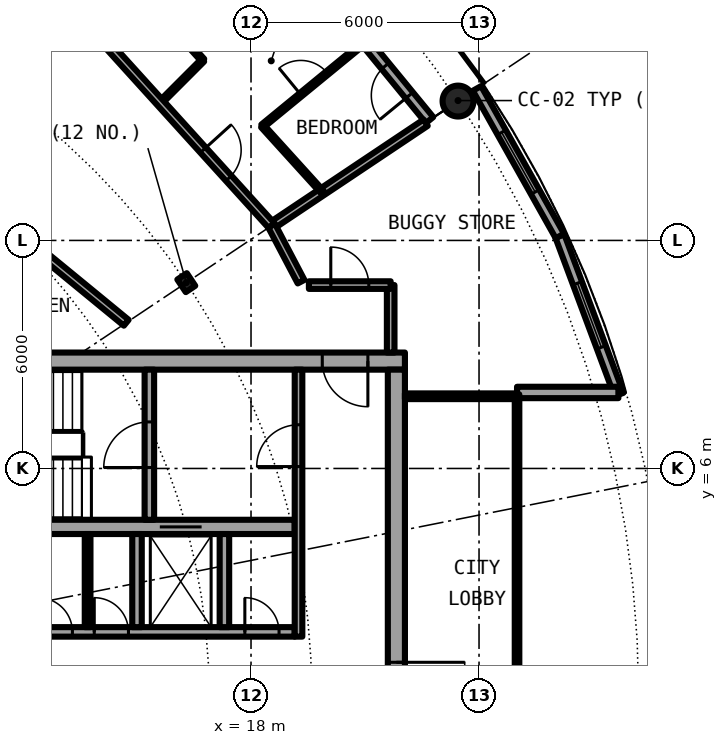
"""IFC4 building model, lengths in metres.
Left out: names, types, materials, properties, quantities, classifications, styles, units other than length and angle.
Written with IfcOpenShell. Run it as: python <this file> out.ifc"""

import sys

from ifc_helpers import new_model, si_unit, direction, frame, frame_2d, origin, origin_2d, place, context, subcontext, project, spatial, rectangle, hollow_circle, i_section, extrude, element, fill, save


model = new_model("IFC4")
c1 = context("Model", 3, precision=1e-05, world=origin(), true_north=direction((0.0, 1.0)))
c2 = subcontext(c1, "Body", "Model", "MODEL_VIEW")
j1 = project(units=[si_unit("LENGTHUNIT", "METRE"), si_unit("PLANEANGLEUNIT", "RADIAN")], contexts=[c1])
p1 = place(None, origin())
s1 = spatial("IfcSite", under=j1, at=p1, CompositionType="ELEMENT")
p2 = place(p1, origin())
s2 = spatial("IfcBuilding", under=s1, at=p2, CompositionType="ELEMENT")
p3 = place(p2, frame((0.0, 0.0, 212.7)))
s3 = spatial("IfcBuildingStorey", under=s2, at=p3, CompositionType="ELEMENT", Elevation=212.7)
p4 = place(p3, frame((23.448, 15.667, 0.0), z_axis=(0.0, 0.0, 1.0), x_axis=(1.0, 0.0, 0.0)))
e1 = element("IfcColumn", 1, at=p4, inside=s3, PredefinedType="COLUMN", context=c2, shape_type="SweptSolid", body=[
    extrude(hollow_circle(Radius=0.406, WallThickness=0.03, at=origin_2d()), origin(), (0.0, 0.0, 1.0), 3.05),
])
p5 = place(p3, frame((16.297, 10.889, 0.0), z_axis=(0.0, 0.0, 1.0), x_axis=(0.831469612303, 0.55557023302, 0.0)))
e2 = element("IfcColumn", 2, at=p5, inside=s3, PredefinedType="COLUMN", context=c2, shape_type="SweptSolid", body=[
    extrude(i_section(OverallWidth=0.3, OverallDepth=0.4, WebThickness=0.013, FlangeThickness=0.024, FilletRadius=0.027, at=origin_2d()), origin(), (0.0, 0.0, 1.0), 3.05),
])
p6 = place(p3, frame((22.699, 15.167, 0.0), z_axis=(0.0, 0.0, 1.0), x_axis=(-0.634382322723, 0.773019449054, 0.0)))
e3 = element("IfcWall", 3, at=p6, inside=s3, PredefinedType="SOLIDWALL", context=c2, shape_type="SweptSolid", body=[
    extrude(rectangle(XDim=5.352, YDim=0.25, at=frame_2d((2.676, 0.0))), origin(), (0.0, 0.0, 1.0), 2.7),
])
p7 = place(p6, frame((0.841, 0.0, 0.0)))
e4 = element("IfcOpeningElement", 4, at=p7, cuts=e3, PredefinedType="OPENING", context=c2, shape_type="SweptSolid", body=[
    extrude(rectangle(XDim=1.0, YDim=2.2, at=frame_2d((0.5, 1.1))), frame((0.0, 0.135, 0.0), z_axis=(0.0, -1.0, 0.0), x_axis=(1.0, 0.0, 0.0)), (0.0, 0.0, 1.0), 0.27),
])
p8 = place(p6, frame((3.111, 0.0, 0.3)))
e5 = element("IfcOpeningElement", 5, at=p8, cuts=e3, PredefinedType="OPENING", context=c2, shape_type="SweptSolid", body=[
    extrude(rectangle(XDim=1.8, YDim=2.1, at=frame_2d((0.9, 1.05))), frame((0.0, 0.135, 0.0), z_axis=(0.0, -1.0, 0.0), x_axis=(1.0, 0.0, 0.0)), (0.0, 0.0, 1.0), 0.27),
])
p9 = place(p3, frame((27.682, 7.945, 0.0), z_axis=(0.0, 0.0, 1.0), x_axis=(-0.349247811493, 0.937030397675, 0.0)))
e6 = element("IfcWall", 6, at=p9, inside=s3, PredefinedType="SOLIDWALL", context=c2, shape_type="SweptSolid", body=[
    extrude(rectangle(XDim=4.452, YDim=0.25, at=frame_2d((2.226, 0.0))), origin(), (0.0, 0.0, 1.0), 2.7),
])
p10 = place(p9, frame((1.327, 0.0, 0.3)))
e7 = element("IfcOpeningElement", 7, at=p10, cuts=e6, PredefinedType="OPENING", context=c2, shape_type="SweptSolid", body=[
    extrude(rectangle(XDim=1.8, YDim=2.1, at=frame_2d((0.9, 1.05))), frame((0.0, 0.135, 0.0), z_axis=(0.0, -1.0, 0.0), x_axis=(1.0, 0.0, 0.0)), (0.0, 0.0, 1.0), 0.27),
])
p11 = place(p3, frame((26.127, 12.117, 0.0), z_axis=(0.0, 0.0, 1.0), x_axis=(-0.489696356642, 0.871893042919, 0.0)))
e8 = element("IfcWall", 8, at=p11, inside=s3, PredefinedType="SOLIDWALL", context=c2, shape_type="SweptSolid", body=[
    extrude(rectangle(XDim=4.454, YDim=0.25, at=frame_2d((2.227, 0.0))), origin(), (0.0, 0.0, 1.0), 2.7),
])
p12 = place(p11, frame((1.327, 0.0, 0.3)))
e9 = element("IfcOpeningElement", 9, at=p12, cuts=e8, PredefinedType="OPENING", context=c2, shape_type="SweptSolid", body=[
    extrude(rectangle(XDim=1.8, YDim=2.1, at=frame_2d((0.9, 1.05))), frame((0.0, 0.135, 0.0), z_axis=(0.0, -1.0, 0.0), x_axis=(1.0, 0.0, 0.0)), (0.0, 0.0, 1.0), 0.27),
])
p13 = place(p3, frame((25.0, 8.0, 0.0), z_axis=(0.0, 0.0, 1.0), x_axis=(1.0, 0.0, 0.0)))
e10 = element("IfcWall", 10, at=p13, inside=s3, PredefinedType="SOLIDWALL", context=c2, shape_type="SweptSolid", body=[
    extrude(rectangle(XDim=2.667, YDim=0.3, at=frame_2d((1.333, 0.0))), origin(), (0.0, 0.0, 1.0), 2.7),
])
p14 = place(p3, frame((22.05, 8.825, 0.0), z_axis=(0.0, 0.0, 1.0), x_axis=(-1.0, 0.0, 0.0)))
e11 = element("IfcWall", 11, at=p14, inside=s3, PredefinedType="SHEAR", context=c2, shape_type="SweptSolid", body=[
    extrude(rectangle(XDim=13.5, YDim=0.45, at=frame_2d((6.75, 0.0))), origin(), (0.0, 0.0, 1.0), 3.05),
])
p15 = place(p14, frame((0.975, 0.0, 0.0)))
e12 = element("IfcOpeningElement", 12, at=p15, cuts=e11, PredefinedType="OPENING", context=c2, shape_type="SweptSolid", body=[
    extrude(rectangle(XDim=1.2, YDim=2.3, at=frame_2d((0.6, 1.15))), frame((0.0, 0.235, 0.0), z_axis=(0.0, -1.0, 0.0), x_axis=(1.0, 0.0, 0.0)), (0.0, 0.0, 1.0), 0.47),
])
p16 = place(p3, frame((21.825, 8.6, 0.0), z_axis=(0.0, 0.0, 1.0), x_axis=(0.0, -1.0, 0.0)))
e13 = element("IfcWall", 13, at=p16, inside=s3, PredefinedType="SHEAR", context=c2, shape_type="SweptSolid", body=[
    extrude(rectangle(XDim=17.2, YDim=0.45, at=frame_2d((8.6, 0.0))), origin(), (0.0, 0.0, 1.0), 3.05),
])
p17 = place(p16, frame((7.7, 0.0, 0.0)))
e14 = element("IfcOpeningElement", 14, at=p17, cuts=e13, PredefinedType="OPENING", context=c2, shape_type="SweptSolid", body=[
    extrude(rectangle(XDim=1.8, YDim=2.3, at=frame_2d((0.9, 1.15))), frame((0.0, 0.235, 0.0), z_axis=(0.0, -1.0, 0.0), x_axis=(1.0, 0.0, 0.0)), (0.0, 0.0, 1.0), 0.47),
])
p18 = place(p3, frame((9.0, 1.7, 0.0), z_axis=(0.0, 0.0, 1.0), x_axis=(1.0, 0.0, 0.0)))
e15 = element("IfcWall", 15, at=p18, inside=s3, PredefinedType="SHEAR", context=c2, shape_type="SweptSolid", body=[
    extrude(rectangle(XDim=10.15, YDim=0.25, at=frame_2d((5.075, 0.0))), origin(), (0.0, 0.0, 1.0), 3.05),
])
p19 = place(p18, frame((0.062, 0.0, 0.0)))
e16 = element("IfcOpeningElement", 16, at=p19, cuts=e15, PredefinedType="OPENING", context=c2, shape_type="SweptSolid", body=[
    extrude(rectangle(XDim=0.9, YDim=2.3, at=frame_2d((0.45, 1.15))), frame((0.0, 0.135, 0.0), z_axis=(0.0, -1.0, 0.0), x_axis=(1.0, 0.0, 0.0)), (0.0, 0.0, 1.0), 0.27),
])
p20 = place(p18, frame((1.6, 0.0, 0.0)))
e17 = element("IfcOpeningElement", 17, at=p20, cuts=e15, PredefinedType="OPENING", context=c2, shape_type="SweptSolid", body=[
    extrude(rectangle(XDim=0.9, YDim=2.3, at=frame_2d((0.45, 1.15))), frame((0.0, 0.135, 0.0), z_axis=(0.0, -1.0, 0.0), x_axis=(1.0, 0.0, 0.0)), (0.0, 0.0, 1.0), 0.27),
])
p21 = place(p18, frame((3.4, 0.0, 0.0)))
e18 = element("IfcOpeningElement", 18, at=p21, cuts=e15, PredefinedType="OPENING", context=c2, shape_type="SweptSolid", body=[
    extrude(rectangle(XDim=0.9, YDim=2.3, at=frame_2d((0.45, 1.15))), frame((0.0, 0.135, 0.0), z_axis=(0.0, -1.0, 0.0), x_axis=(1.0, 0.0, 0.0)), (0.0, 0.0, 1.0), 0.27),
])
p22 = place(p18, frame((4.875, 0.0, 0.0)))
e19 = element("IfcOpeningElement", 19, at=p22, cuts=e15, PredefinedType="OPENING", context=c2, shape_type="SweptSolid", body=[
    extrude(rectangle(XDim=0.9, YDim=2.3, at=frame_2d((0.45, 1.15))), frame((0.0, 0.135, 0.0), z_axis=(0.0, -1.0, 0.0), x_axis=(1.0, 0.0, 0.0)), (0.0, 0.0, 1.0), 0.27),
])
p23 = place(p18, frame((8.837, 0.0, 0.0)))
e20 = element("IfcOpeningElement", 20, at=p23, cuts=e15, PredefinedType="OPENING", context=c2, shape_type="SweptSolid", body=[
    extrude(rectangle(XDim=0.9, YDim=2.3, at=frame_2d((0.45, 1.15))), frame((0.0, 0.135, 0.0), z_axis=(0.0, -1.0, 0.0), x_axis=(1.0, 0.0, 0.0)), (0.0, 0.0, 1.0), 0.27),
])
p24 = place(p3, frame((9.0, 4.462, 0.0), z_axis=(0.0, 0.0, 1.0), x_axis=(1.0, 0.0, 0.0)))
e21 = element("IfcWall", 21, at=p24, inside=s3, PredefinedType="SHEAR", context=c2, shape_type="SweptSolid", body=[
    extrude(rectangle(XDim=10.15, YDim=0.375, at=frame_2d((5.075, 0.0))), origin(), (0.0, 0.0, 1.0), 3.05),
])
p25 = place(p24, frame((6.6, 0.0, 0.0)))
e22 = element("IfcOpeningElement", 22, at=p25, cuts=e21, PredefinedType="OPENING", context=c2, shape_type="SweptSolid", body=[
    extrude(rectangle(XDim=1.1, YDim=2.3, at=frame_2d((0.55, 1.15))), frame((0.0, 0.198, 0.0), z_axis=(0.0, -1.0, 0.0), x_axis=(1.0, 0.0, 0.0)), (0.0, 0.0, 1.0), 0.395),
])
p26 = place(p3, frame((15.325, 4.65, 0.0), z_axis=(0.0, 0.0, 1.0), x_axis=(0.0, 1.0, 0.0)))
e23 = element("IfcWall", 23, at=p26, inside=s3, PredefinedType="SHEAR", context=c2, shape_type="SweptSolid", body=[
    extrude(rectangle(XDim=3.95, YDim=0.25, at=frame_2d((1.975, 0.0))), origin(), (0.0, 0.0, 1.0), 3.05),
])
p27 = place(p26, frame((1.375, 0.0, 0.0)))
e24 = element("IfcOpeningElement", 24, at=p27, cuts=e23, PredefinedType="OPENING", context=c2, shape_type="SweptSolid", body=[
    extrude(rectangle(XDim=1.2, YDim=2.3, at=frame_2d((0.6, 1.15))), frame((0.0, 0.135, 0.0), z_axis=(0.0, -1.0, 0.0), x_axis=(1.0, 0.0, 0.0)), (0.0, 0.0, 1.0), 0.27),
])
for number, where, z_axis, x_axis in (
    (25, (15.0, 1.825, 0.0), (0.0, 0.0, 1.0), (0.0, 1.0, 0.0)),
    (26, (17.3, 1.825, 0.0), (0.0, 0.0, 1.0), (0.0, 1.0, 0.0)),
):
    element("IfcWall", number, at=place(p3, frame(where, z_axis=z_axis, x_axis=x_axis)), inside=s3, PredefinedType="SOLIDWALL", context=c2, shape_type="SweptSolid", body=[
        extrude(rectangle(XDim=2.45, YDim=0.25, at=frame_2d((1.225, 0.0))), origin(), (0.0, 0.0, 1.0), 2.7),
    ])
p28 = place(p3, frame((19.25, 1.575, 0.0), z_axis=(0.0, 0.0, 1.0), x_axis=(0.0, 1.0, 0.0)))
e27 = element("IfcWall", 27, at=p28, inside=s3, PredefinedType="SOLIDWALL", context=c2, shape_type="SweptSolid", body=[
    extrude(rectangle(XDim=7.025, YDim=0.2, at=frame_2d((3.513, 0.0))), origin(), (0.0, 0.0, 1.0), 2.7),
])
p29 = place(p28, frame((4.475, 0.0, 0.0)))
e28 = element("IfcOpeningElement", 28, at=p29, cuts=e27, PredefinedType="OPENING", context=c2, shape_type="SweptSolid", body=[
    extrude(rectangle(XDim=1.1, YDim=2.3, at=frame_2d((0.55, 1.15))), frame((0.0, 0.11, 0.0), z_axis=(0.0, -1.0, 0.0), x_axis=(1.0, 0.0, 0.0)), (0.0, 0.0, 1.0), 0.22),
])
p30 = place(p3, frame((13.7, 1.825, 0.0), z_axis=(0.0, 0.0, 1.0), x_axis=(0.0, 1.0, 0.0)))
e29 = element("IfcWall", 29, at=p30, inside=s3, PredefinedType="PARTITIONING", context=c2, shape_type="SweptSolid", body=[
    extrude(rectangle(XDim=2.45, YDim=0.15, at=frame_2d((1.225, 0.0))), origin(), (0.0, 0.0, 1.0), 2.7),
])
p31 = place(p3, frame((22.05, 7.9, 0.0), z_axis=(0.0, 0.0, 1.0), x_axis=(1.0, 0.0, 0.0)))
e30 = element("IfcWall", 30, at=p31, inside=s3, PredefinedType="PARTITIONING", context=c2, shape_type="SweptSolid", body=[
    extrude(rectangle(XDim=2.89, YDim=0.15, at=frame_2d((1.445, 0.0))), origin(), (0.0, 0.0, 1.0), 2.7),
])
p32 = place(p3, frame((25.0, -7.95, 0.0), z_axis=(0.0, 0.0, 1.0), x_axis=(0.0, 1.0, 0.0)))
e31 = element("IfcWall", 31, at=p32, inside=s3, PredefinedType="PARTITIONING", context=c2, shape_type="SweptSolid", body=[
    extrude(rectangle(XDim=15.9, YDim=0.12, at=frame_2d((7.95, 0.0))), origin(), (0.0, 0.0, 1.0), 2.7),
])
p33 = place(p32, frame((0.95, 0.0, 0.1)))
e32 = element("IfcOpeningElement", 32, at=p33, cuts=e31, PredefinedType="OPENING", context=c2, shape_type="SweptSolid", body=[
    extrude(rectangle(XDim=14.0, YDim=2.35, at=frame_2d((7.0, 1.175))), frame((0.0, 0.07, 0.0), z_axis=(0.0, -1.0, 0.0), x_axis=(1.0, 0.0, 0.0)), (0.0, 0.0, 1.0), 0.14),
])
p34 = place(p3, frame((21.675, 9.05, 0.0), z_axis=(0.0, 0.0, 1.0), x_axis=(0.0, 1.0, 0.0)))
e33 = element("IfcWall", 33, at=p34, inside=s3, PredefinedType="PARTITIONING", context=c2, shape_type="SweptSolid", body=[
    extrude(rectangle(XDim=1.775, YDim=0.2, at=frame_2d((0.887, 0.0))), origin(), (0.0, 0.0, 1.0), 2.7),
])
p35 = place(p3, frame((15.612, 15.622, 0.0), z_axis=(0.0, 0.0, 1.0), x_axis=(0.70679853939, 0.707414888673, 0.0)))
e34 = element("IfcWall", 34, at=p35, inside=s3, PredefinedType="PARTITIONING", context=c2, shape_type="SweptSolid", body=[
    extrude(rectangle(XDim=1.584, YDim=0.1, at=frame_2d((0.792, 0.0))), origin(), (0.0, 0.0, 1.0), 2.7),
])
p36 = place(p3, frame((18.302, 15.01, 0.0), z_axis=(0.0, 0.0, 1.0), x_axis=(0.773165322764, 0.634204528267, 0.0)))
e35 = element("IfcWall", 35, at=p36, inside=s3, PredefinedType="PARTITIONING", context=c2, shape_type="SweptSolid", body=[
    extrude(rectangle(XDim=3.505, YDim=0.1, at=frame_2d((1.752, 0.0))), origin(), (0.0, 0.0, 1.0), 2.7),
])
p37 = place(p36, frame((1.303, 0.0, 0.0)))
e36 = element("IfcOpeningElement", 36, at=p37, cuts=e35, PredefinedType="OPENING", context=c2, shape_type="SweptSolid", body=[
    extrude(rectangle(XDim=0.9, YDim=2.3, at=frame_2d((0.45, 1.15))), frame((0.0, 0.06, 0.0), z_axis=(0.0, -1.0, 0.0), x_axis=(1.0, 0.0, 0.0)), (0.0, 0.0, 1.0), 0.12),
])
p38 = place(p3, frame((18.542, 12.389, 0.0), z_axis=(0.0, 0.0, 1.0), x_axis=(0.831387096605, 0.55569370664, 0.0)))
e37 = element("IfcWall", 37, at=p38, inside=s3, PredefinedType="PARTITIONING", context=c2, shape_type="SweptSolid", body=[
    extrude(rectangle(XDim=4.875, YDim=0.2, at=frame_2d((2.438, 0.0))), origin(), (0.0, 0.0, 1.0), 2.7),
])
p39 = place(p3, frame((19.523, 10.825, 0.0), z_axis=(0.0, 0.0, 1.0), x_axis=(1.0, 0.0, 0.0)))
e38 = element("IfcWall", 38, at=p39, inside=s3, PredefinedType="PARTITIONING", context=c2, shape_type="SweptSolid", body=[
    extrude(rectangle(XDim=2.152, YDim=0.2, at=frame_2d((1.076, 0.0))), origin(), (0.0, 0.0, 1.0), 2.7),
])
p40 = place(p39, frame((0.576, 0.0, 0.0)))
e39 = element("IfcOpeningElement", 39, at=p40, cuts=e38, PredefinedType="OPENING", context=c2, shape_type="SweptSolid", body=[
    extrude(rectangle(XDim=1.0, YDim=2.3, at=frame_2d((0.5, 1.15))), frame((0.0, 0.11, 0.0), z_axis=(0.0, -1.0, 0.0), x_axis=(1.0, 0.0, 0.0)), (0.0, 0.0, 1.0), 0.22),
])
p41 = place(p3, frame((6.773, 16.353, 0.0), z_axis=(0.0, 0.0, 1.0), x_axis=(0.773034536097, -0.634363938131, 0.0)))
e40 = element("IfcWall", 40, at=p41, inside=s3, PredefinedType="PARTITIONING", context=c2, shape_type="SweptSolid", body=[
    extrude(rectangle(XDim=10.277, YDim=0.2, at=frame_2d((5.138, 0.0))), origin(), (0.0, 0.0, 1.0), 2.7),
])
p42 = place(p41, frame((4.638, 0.0, 0.0)))
e41 = element("IfcOpeningElement", 41, at=p42, cuts=e40, PredefinedType="OPENING", context=c2, shape_type="SweptSolid", body=[
    extrude(rectangle(XDim=1.0, YDim=2.3, at=frame_2d((0.5, 1.15))), frame((0.0, 0.11, 0.0), z_axis=(0.0, -1.0, 0.0), x_axis=(1.0, 0.0, 0.0)), (0.0, 0.0, 1.0), 0.22),
])
p43 = place(p3, frame((14.147, 17.238, 0.0), z_axis=(0.0, 0.0, 1.0), x_axis=(0.671561669125, -0.740948665268, 0.0)))
e42 = element("IfcWall", 42, at=p43, inside=s3, PredefinedType="PARTITIONING", context=c2, shape_type="SweptSolid", body=[
    extrude(rectangle(XDim=6.544, YDim=0.2, at=frame_2d((3.272, 0.0))), origin(), (0.0, 0.0, 1.0), 2.7),
])
p44 = place(p43, frame((3.862, 0.0, 0.0)))
e43 = element("IfcOpeningElement", 43, at=p44, cuts=e42, PredefinedType="OPENING", context=c2, shape_type="SweptSolid", body=[
    extrude(rectangle(XDim=1.0, YDim=2.3, at=frame_2d((0.5, 1.15))), frame((0.0, 0.11, 0.0), z_axis=(0.0, -1.0, 0.0), x_axis=(1.0, 0.0, 0.0)), (0.0, 0.0, 1.0), 0.22),
])
p45 = place(p3, frame((18.542, 12.389, 0.0), z_axis=(0.0, 0.0, 1.0), x_axis=(0.465359652486, -0.885121683068, 0.0)))
e44 = element("IfcWall", 44, at=p45, inside=s3, PredefinedType="PARTITIONING", context=c2, shape_type="SweptSolid", body=[
    extrude(rectangle(XDim=1.665, YDim=0.2, at=frame_2d((0.833, 0.0))), origin(), (0.0, 0.0, 1.0), 2.7),
])
p46 = place(p3, frame((15.162, 18.475, 0.0), z_axis=(0.0, 0.0, 1.0), x_axis=(0.671528384412, -0.740978831634, 0.0)))
e45 = element("IfcWall", 45, at=p46, inside=s3, PredefinedType="PARTITIONING", context=c2, shape_type="SweptSolid", body=[
    extrude(rectangle(XDim=2.338, YDim=0.1, at=frame_2d((1.169, 0.0))), origin(), (0.0, 0.0, 1.0), 2.7),
])
p47 = place(p46, frame((0.719, 0.0, 0.0)))
e46 = element("IfcOpeningElement", 46, at=p47, cuts=e45, PredefinedType="OPENING", context=c2, shape_type="SweptSolid", body=[
    extrude(rectangle(XDim=0.9, YDim=2.3, at=frame_2d((0.45, 1.15))), frame((0.0, 0.06, 0.0), z_axis=(0.0, -1.0, 0.0), x_axis=(1.0, 0.0, 0.0)), (0.0, 0.0, 1.0), 0.12),
])
p48 = place(p3, frame((18.302, 15.01, 0.0), z_axis=(0.0, 0.0, 1.0), x_axis=(0.671637685376, -0.740879760544, 0.0)))
e47 = element("IfcWall", 47, at=p48, inside=s3, PredefinedType="PARTITIONING", context=c2, shape_type="SweptSolid", body=[
    extrude(rectangle(XDim=2.338, YDim=0.1, at=frame_2d((1.169, 0.0))), origin(), (0.0, 0.0, 1.0), 2.7),
])
p49 = place(p7, origin())
e48 = element("IfcDoor", 48, at=p49, inside=s3, OperationType="SINGLE_SWING_LEFT", PredefinedType="DOOR", context=c2, shape_type="SweptSolid", body=[
    extrude(rectangle(XDim=1.0, YDim=2.2, at=frame_2d((0.5, 1.1))), frame((0.0, 0.025, 0.0), z_axis=(0.0, -1.0, 0.0), x_axis=(1.0, 0.0, 0.0)), (0.0, 0.0, 1.0), 0.05),
])
fill(e4, e48)
p50 = place(p10, origin())
e49 = element("IfcWindow", 49, at=p50, inside=s3, PartitioningType="SINGLE_PANEL", PredefinedType="WINDOW", context=c2, shape_type="SweptSolid", body=[
    extrude(rectangle(XDim=1.8, YDim=2.1, at=frame_2d((0.9, 1.05))), frame((0.0, 0.03, 0.0), z_axis=(0.0, -1.0, 0.0), x_axis=(1.0, 0.0, 0.0)), (0.0, 0.0, 1.0), 0.06),
])
fill(e7, e49)
p51 = place(p12, origin())
e50 = element("IfcWindow", 50, at=p51, inside=s3, PartitioningType="SINGLE_PANEL", PredefinedType="WINDOW", context=c2, shape_type="SweptSolid", body=[
    extrude(rectangle(XDim=1.8, YDim=2.1, at=frame_2d((0.9, 1.05))), frame((0.0, 0.03, 0.0), z_axis=(0.0, -1.0, 0.0), x_axis=(1.0, 0.0, 0.0)), (0.0, 0.0, 1.0), 0.06),
])
fill(e9, e50)
p52 = place(p25, origin())
e51 = element("IfcDoor", 51, at=p52, inside=s3, OperationType="DOUBLE_DOOR_SLIDING", PredefinedType="DOOR", context=c2, shape_type="SweptSolid", body=[
    extrude(rectangle(XDim=1.1, YDim=2.3, at=frame_2d((0.55, 1.15))), frame((0.0, 0.025, 0.0), z_axis=(0.0, -1.0, 0.0), x_axis=(1.0, 0.0, 0.0)), (0.0, 0.0, 1.0), 0.05),
])
fill(e22, e51)
p53 = place(p21, origin())
e52 = element("IfcDoor", 52, at=p53, inside=s3, OperationType="SINGLE_SWING_RIGHT", PredefinedType="DOOR", context=c2, shape_type="SweptSolid", body=[
    extrude(rectangle(XDim=0.9, YDim=2.3, at=frame_2d((0.45, 1.15))), frame((0.0, 0.025, 0.0), z_axis=(0.0, -1.0, 0.0), x_axis=(1.0, 0.0, 0.0)), (0.0, 0.0, 1.0), 0.05),
])
fill(e18, e52)
p54 = place(p22, origin())
e53 = element("IfcDoor", 53, at=p54, inside=s3, OperationType="SINGLE_SWING_LEFT", PredefinedType="DOOR", context=c2, shape_type="SweptSolid", body=[
    extrude(rectangle(XDim=0.9, YDim=2.3, at=frame_2d((0.45, 1.15))), frame((0.0, 0.025, 0.0), z_axis=(0.0, -1.0, 0.0), x_axis=(1.0, 0.0, 0.0)), (0.0, 0.0, 1.0), 0.05),
])
fill(e19, e53)
p55 = place(p23, origin())
e54 = element("IfcDoor", 54, at=p55, inside=s3, OperationType="SINGLE_SWING_LEFT", PredefinedType="DOOR", context=c2, shape_type="SweptSolid", body=[
    extrude(rectangle(XDim=0.9, YDim=2.3, at=frame_2d((0.45, 1.15))), frame((0.0, 0.025, 0.0), z_axis=(0.0, -1.0, 0.0), x_axis=(1.0, 0.0, 0.0)), (0.0, 0.0, 1.0), 0.05),
])
fill(e20, e54)
p56 = place(p27, origin())
e55 = element("IfcDoor", 55, at=p56, inside=s3, OperationType="SINGLE_SWING_LEFT", PredefinedType="DOOR", context=c2, shape_type="SweptSolid", body=[
    extrude(rectangle(XDim=1.2, YDim=2.3, at=frame_2d((0.6, 1.15))), frame((0.0, 0.025, 0.0), z_axis=(0.0, -1.0, 0.0), x_axis=(1.0, 0.0, 0.0)), (0.0, 0.0, 1.0), 0.05),
])
fill(e24, e55)
p57 = place(p29, origin())
e56 = element("IfcDoor", 56, at=p57, inside=s3, OperationType="SINGLE_SWING_LEFT", PredefinedType="DOOR", context=c2, shape_type="SweptSolid", body=[
    extrude(rectangle(XDim=1.1, YDim=2.3, at=frame_2d((0.55, 1.15))), frame((0.0, 0.025, 0.0), z_axis=(0.0, -1.0, 0.0), x_axis=(1.0, 0.0, 0.0)), (0.0, 0.0, 1.0), 0.05),
])
fill(e28, e56)
p58 = place(p15, origin())
e57 = element("IfcDoor", 57, at=p58, inside=s3, OperationType="SINGLE_SWING_RIGHT", PredefinedType="DOOR", context=c2, shape_type="SweptSolid", body=[
    extrude(rectangle(XDim=1.2, YDim=2.3, at=frame_2d((0.6, 1.15))), frame((0.0, 0.025, 0.0), z_axis=(0.0, -1.0, 0.0), x_axis=(1.0, 0.0, 0.0)), (0.0, 0.0, 1.0), 0.05),
])
fill(e12, e57)
p59 = place(p17, origin())
e58 = element("IfcDoor", 58, at=p59, inside=s3, OperationType="SINGLE_SWING_LEFT", PredefinedType="DOOR", context=c2, shape_type="SweptSolid", body=[
    extrude(rectangle(XDim=1.8, YDim=2.3, at=frame_2d((0.9, 1.15))), frame((0.0, 0.025, 0.0), z_axis=(0.0, -1.0, 0.0), x_axis=(1.0, 0.0, 0.0)), (0.0, 0.0, 1.0), 0.05),
])
fill(e14, e58)
p60 = place(p33, origin())
e59 = element("IfcWindow", 59, at=p60, inside=s3, PartitioningType="SINGLE_PANEL", PredefinedType="WINDOW", context=c2, shape_type="SweptSolid", body=[
    extrude(rectangle(XDim=14.0, YDim=2.35, at=frame_2d((7.0, 1.175))), frame((0.0, 0.03, 0.0), z_axis=(0.0, -1.0, 0.0), x_axis=(1.0, 0.0, 0.0)), (0.0, 0.0, 1.0), 0.06),
])
fill(e32, e59)
p61 = place(p44, origin())
e60 = element("IfcDoor", 60, at=p61, inside=s3, OperationType="SINGLE_SWING_RIGHT", PredefinedType="DOOR", context=c2, shape_type="SweptSolid", body=[
    extrude(rectangle(XDim=1.0, YDim=2.3, at=frame_2d((0.5, 1.15))), frame((0.0, 0.025, 0.0), z_axis=(0.0, -1.0, 0.0), x_axis=(1.0, 0.0, 0.0)), (0.0, 0.0, 1.0), 0.05),
])
fill(e43, e60)
p62 = place(p37, origin())
e61 = element("IfcDoor", 61, at=p62, inside=s3, OperationType="SINGLE_SWING_RIGHT", PredefinedType="DOOR", context=c2, shape_type="SweptSolid", body=[
    extrude(rectangle(XDim=0.9, YDim=2.3, at=frame_2d((0.45, 1.15))), frame((0.0, 0.025, 0.0), z_axis=(0.0, -1.0, 0.0), x_axis=(1.0, 0.0, 0.0)), (0.0, 0.0, 1.0), 0.05),
])
fill(e36, e61)
p63 = place(p40, origin())
e62 = element("IfcDoor", 62, at=p63, inside=s3, OperationType="SINGLE_SWING_LEFT", PredefinedType="DOOR", context=c2, shape_type="SweptSolid", body=[
    extrude(rectangle(XDim=1.0, YDim=2.3, at=frame_2d((0.5, 1.15))), frame((0.0, 0.025, 0.0), z_axis=(0.0, -1.0, 0.0), x_axis=(1.0, 0.0, 0.0)), (0.0, 0.0, 1.0), 0.05),
])
fill(e39, e62)
save(model, sys.argv[1])
